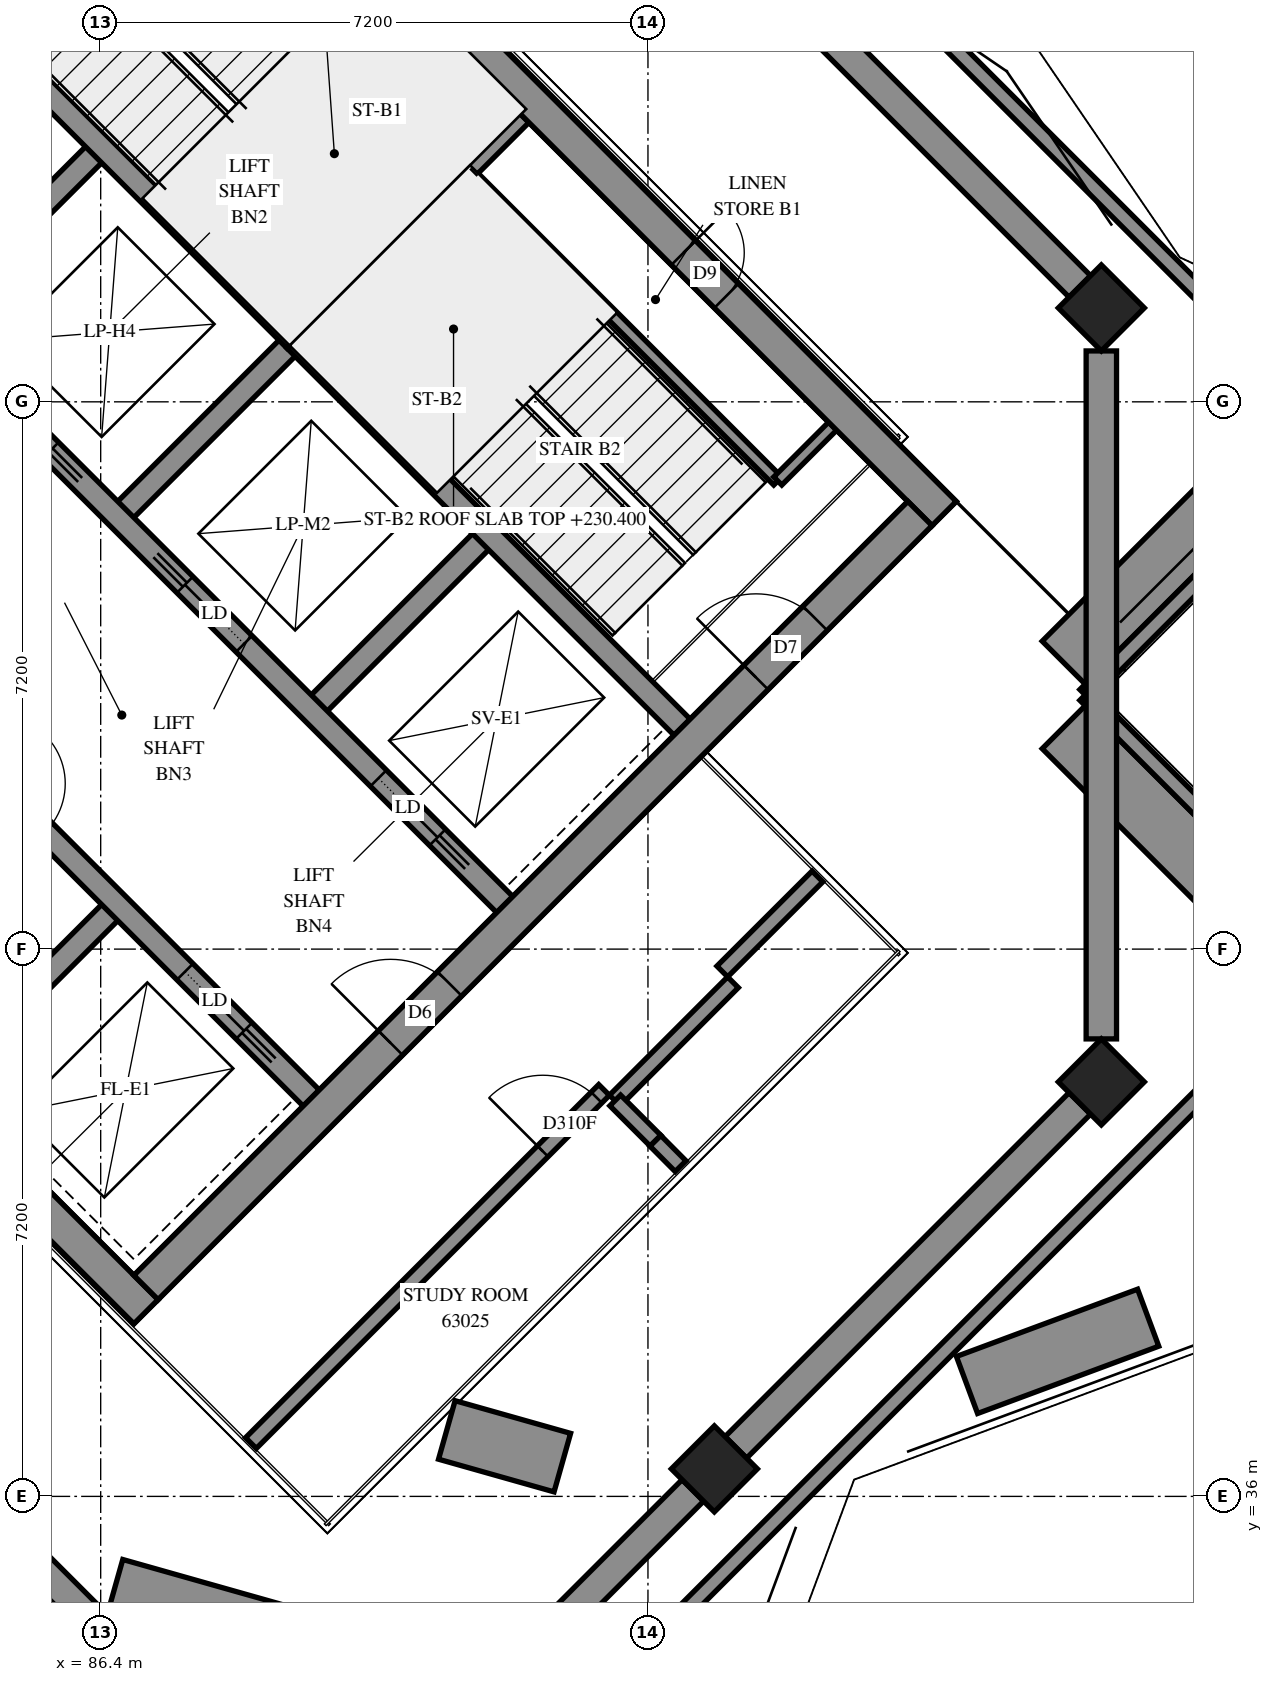
"""IFC4 building model, lengths in metres.
Left out: names, types, materials, properties, quantities, classifications, styles, units other than length and angle.
Written with IfcOpenShell. Run it as: python <this file> out.ifc"""

import sys

from ifc_helpers import new_model, si_unit, direction, frame, frame_2d, origin, origin_2d, place, context, subcontext, project, spatial, polyline, rectangle, outline, extrude, element, fill, save


model = new_model("IFC4")
c1 = context("Model", 3, precision=1e-05, world=origin(), true_north=direction((0.0, 1.0)))
c2 = subcontext(c1, "Body", "Model", "MODEL_VIEW")
j1 = project(units=[si_unit("LENGTHUNIT", "METRE"), si_unit("PLANEANGLEUNIT", "RADIAN")], contexts=[c1])
p1 = place(None, origin())
s1 = spatial("IfcSite", under=j1, at=p1, CompositionType="ELEMENT")
p2 = place(p1, origin())
s2 = spatial("IfcBuilding", under=s1, at=p2, CompositionType="ELEMENT")
p3 = place(p2, frame((0.0, 0.0, 230.4)))
s3 = spatial("IfcBuildingStorey", under=s2, at=p3, CompositionType="ELEMENT", Elevation=230.4)
for number, where, z_axis, x_axis in (
    (1, (99.565, 51.635, 0.0), (0.0, 0.0, 1.0), (0.707, -0.707, 0.0)),
    (2, (99.565, 41.453, 0.0), (0.0, 0.0, 1.0), (0.707, -0.707, 0.0)),
    (3, (94.474, 36.362, 0.0), (0.0, 0.0, 1.0), (0.707, -0.707, 0.0)),
):
    element("IfcColumn", number, at=place(p3, frame(where, z_axis=z_axis, x_axis=x_axis)), inside=s3, PredefinedType="COLUMN", context=c2, shape_type="SweptSolid", body=[
        extrude(rectangle(XDim=0.8, YDim=0.8, at=origin_2d()), origin(), (0.0, 0.0, 1.0), 3.9),
    ])
p4 = place(p3, frame((76.177, 49.249, -0.3), z_axis=(0.0, 0.0, 1.0), x_axis=(0.7071100491, -0.7071035132, 0.0)))
e4 = element("IfcWall", 4, at=p4, inside=s3, PredefinedType="SHEAR", context=c2, shape_type="SweptSolid", body=[
    extrude(rectangle(XDim=15.3, YDim=0.45, at=frame_2d((7.65, 0.0))), origin(), (0.0, 0.0, 1.0), 3.5),
])
p5 = place(p3, frame((86.678, 59.749, -0.3), z_axis=(0.0, 0.0, 1.0), x_axis=(0.7071035132, -0.7071100491, 0.0)))
e5 = element("IfcWall", 5, at=p5, inside=s3, PredefinedType="SHEAR", context=c2, shape_type="SweptSolid", body=[
    extrude(rectangle(XDim=15.3, YDim=0.45, at=frame_2d((7.65, 0.0))), origin(), (0.0, 0.0, 1.0), 3.5),
])
p6 = place(p5, frame((10.45, 0.0, 0.3)))
e6 = element("IfcOpeningElement", 6, at=p6, cuts=e5, PredefinedType="OPENING", context=c2, shape_type="SweptSolid", body=[
    extrude(rectangle(XDim=0.8, YDim=2.1, at=frame_2d((0.4, 1.05))), frame((0.0, 0.235, 0.0), z_axis=(0.0, -1.0, 0.0), x_axis=(1.0, 0.0, 0.0)), (0.0, 0.0, 1.0), 0.47),
])
p7 = place(p3, frame((76.495, 49.249, -0.3), z_axis=(0.0, 0.0, 1.0), x_axis=(0.7071067812, 0.7071067812, 0.0)))
e7 = element("IfcWall", 7, at=p7, inside=s3, PredefinedType="SHEAR", context=c2, shape_type="SweptSolid", body=[
    extrude(rectangle(XDim=14.4, YDim=0.45, at=frame_2d((7.2, 0.0))), origin(), (0.0, 0.0, 1.0), 3.5),
])
p8 = place(p7, frame((4.55, 0.0, 0.3)))
e8 = element("IfcOpeningElement", 8, at=p8, cuts=e7, PredefinedType="OPENING", context=c2, shape_type="SweptSolid", body=[
    extrude(rectangle(XDim=1.1, YDim=2.1, at=frame_2d((0.55, 1.05))), frame((0.0, 0.235, 0.0), z_axis=(0.0, -1.0, 0.0), x_axis=(1.0, 0.0, 0.0)), (0.0, 0.0, 1.0), 0.47),
])
p9 = place(p7, frame((11.35, 0.0, 0.3)))
e9 = element("IfcOpeningElement", 9, at=p9, cuts=e7, PredefinedType="OPENING", context=c2, shape_type="SweptSolid", body=[
    extrude(rectangle(XDim=1.1, YDim=2.1, at=frame_2d((0.55, 1.05))), frame((0.0, 0.235, 0.0), z_axis=(0.0, -1.0, 0.0), x_axis=(1.0, 0.0, 0.0)), (0.0, 0.0, 1.0), 0.47),
])
p10 = place(p3, frame((86.996, 38.748, -0.3), z_axis=(0.0, 0.0, 1.0), x_axis=(0.7071067812, 0.7071067812, 0.0)))
e10 = element("IfcWall", 10, at=p10, inside=s3, PredefinedType="SHEAR", context=c2, shape_type="SweptSolid", body=[
    extrude(rectangle(XDim=14.4, YDim=0.45, at=frame_2d((7.2, 0.0))), origin(), (0.0, 0.0, 1.0), 3.5),
])
p11 = place(p10, frame((4.55, 0.0, 0.3)))
e11 = element("IfcOpeningElement", 11, at=p11, cuts=e10, PredefinedType="OPENING", context=c2, shape_type="SweptSolid", body=[
    extrude(rectangle(XDim=1.1, YDim=2.1, at=frame_2d((0.55, 1.05))), frame((0.0, 0.235, 0.0), z_axis=(0.0, -1.0, 0.0), x_axis=(1.0, 0.0, 0.0)), (0.0, 0.0, 1.0), 0.47),
])
p12 = place(p10, frame((11.35, 0.0, 0.3)))
e12 = element("IfcOpeningElement", 12, at=p12, cuts=e10, PredefinedType="OPENING", context=c2, shape_type="SweptSolid", body=[
    extrude(rectangle(XDim=1.1, YDim=2.1, at=frame_2d((0.55, 1.05))), frame((0.0, 0.235, 0.0), z_axis=(0.0, -1.0, 0.0), x_axis=(1.0, 0.0, 0.0)), (0.0, 0.0, 1.0), 0.47),
])
p13 = place(p3, frame((84.079, 51.423, 0.0), z_axis=(0.0, 0.0, 1.0), x_axis=(0.7071219326, 0.7070916295, 0.0)))
e13 = element("IfcWall", 13, at=p13, inside=s3, PredefinedType="SOLIDWALL", context=c2, shape_type="SweptSolid", body=[
    extrude(rectangle(XDim=3.3, YDim=0.3, at=frame_2d((1.65, 0.0))), origin(), (0.0, 0.0, 1.0), 3.9),
])
p14 = place(p3, frame((86.625, 48.878, 0.0), z_axis=(0.0, 0.0, 1.0), x_axis=(0.7071067812, 0.7071067812, 0.0)))
e14 = element("IfcWall", 14, at=p14, inside=s3, PredefinedType="SOLIDWALL", context=c2, shape_type="SweptSolid", body=[
    extrude(rectangle(XDim=3.3, YDim=0.3, at=frame_2d((1.65, 0.0))), origin(), (0.0, 0.0, 1.0), 3.9),
])
p15 = place(p3, frame((84.291, 41.453, 0.0), z_axis=(0.0, 0.0, 1.0), x_axis=(0.7071067812, 0.7071067812, 0.0)))
e15 = element("IfcWall", 15, at=p15, inside=s3, PredefinedType="SOLIDWALL", context=c2, shape_type="SweptSolid", body=[
    extrude(rectangle(XDim=3.3, YDim=0.3, at=frame_2d((1.65, 0.0))), origin(), (0.0, 0.0, 1.0), 3.9),
])
p16 = place(p3, frame((89.17, 46.332, 0.0), z_axis=(0.0, 0.0, 1.0), x_axis=(0.7071067812, 0.7071067812, 0.0)))
e16 = element("IfcWall", 16, at=p16, inside=s3, PredefinedType="SOLIDWALL", context=c2, shape_type="SweptSolid", body=[
    extrude(rectangle(XDim=3.3, YDim=0.3, at=frame_2d((1.65, 0.0))), origin(), (0.0, 0.0, 1.0), 3.9),
])
p17 = place(p3, frame((78.988, 51.423, 0.0), z_axis=(0.0, 0.0, 1.0), x_axis=(0.7071067812, -0.7071067812, 0.0)))
e17 = element("IfcWall", 17, at=p17, inside=s3, PredefinedType="SOLIDWALL", context=c2, shape_type="SweptSolid", body=[
    extrude(rectangle(XDim=14.4, YDim=0.3, at=frame_2d((7.2, 0.0))), origin(), (0.0, 0.0, 1.0), 3.9),
])
p18 = place(p17, frame((1.35, 0.0, 0.0)))
e18 = element("IfcOpeningElement", 18, at=p18, cuts=e17, PredefinedType="OPENING", context=c2, shape_type="SweptSolid", body=[
    extrude(rectangle(XDim=0.9, YDim=2.1, at=frame_2d((0.45, 1.05))), frame((0.0, 0.16, 0.0), z_axis=(0.0, -1.0, 0.0), x_axis=(1.0, 0.0, 0.0)), (0.0, 0.0, 1.0), 0.32),
])
p19 = place(p17, frame((4.95, 0.0, 0.0)))
e19 = element("IfcOpeningElement", 19, at=p19, cuts=e17, PredefinedType="OPENING", context=c2, shape_type="SweptSolid", body=[
    extrude(rectangle(XDim=0.9, YDim=2.1, at=frame_2d((0.45, 1.05))), frame((0.0, 0.16, 0.0), z_axis=(0.0, -1.0, 0.0), x_axis=(1.0, 0.0, 0.0)), (0.0, 0.0, 1.0), 0.32),
])
p20 = place(p17, frame((8.55, 0.0, 0.0)))
e20 = element("IfcOpeningElement", 20, at=p20, cuts=e17, PredefinedType="OPENING", context=c2, shape_type="SweptSolid", body=[
    extrude(rectangle(XDim=0.9, YDim=2.1, at=frame_2d((0.45, 1.05))), frame((0.0, 0.16, 0.0), z_axis=(0.0, -1.0, 0.0), x_axis=(1.0, 0.0, 0.0)), (0.0, 0.0, 1.0), 0.32),
])
p21 = place(p17, frame((12.05, 0.0, 0.0)))
e21 = element("IfcOpeningElement", 21, at=p21, cuts=e17, PredefinedType="OPENING", context=c2, shape_type="SweptSolid", body=[
    extrude(rectangle(XDim=1.1, YDim=2.1, at=frame_2d((0.55, 1.05))), frame((0.0, 0.16, 0.0), z_axis=(0.0, -1.0, 0.0), x_axis=(1.0, 0.0, 0.0)), (0.0, 0.0, 1.0), 0.32),
])
p22 = place(p3, frame((81.534, 53.969, 0.0), z_axis=(0.0, 0.0, 1.0), x_axis=(0.707103309, -0.7071102534, 0.0)))
e22 = element("IfcWall", 22, at=p22, inside=s3, PredefinedType="SOLIDWALL", context=c2, shape_type="SweptSolid", body=[
    extrude(rectangle(XDim=14.4, YDim=0.3, at=frame_2d((7.2, 0.0))), origin(), (0.0, 0.0, 1.0), 3.9),
])
p23 = place(p22, frame((1.25, 0.0, 0.0)))
e23 = element("IfcOpeningElement", 23, at=p23, cuts=e22, PredefinedType="OPENING", context=c2, shape_type="SweptSolid", body=[
    extrude(rectangle(XDim=1.1, YDim=2.1, at=frame_2d((0.55, 1.05))), frame((0.0, 0.16, 0.0), z_axis=(0.0, -1.0, 0.0), x_axis=(1.0, 0.0, 0.0)), (0.0, 0.0, 1.0), 0.32),
])
p24 = place(p22, frame((4.85, 0.0, 0.0)))
e24 = element("IfcOpeningElement", 24, at=p24, cuts=e22, PredefinedType="OPENING", context=c2, shape_type="SweptSolid", body=[
    extrude(rectangle(XDim=1.1, YDim=2.1, at=frame_2d((0.55, 1.05))), frame((0.0, 0.16, 0.0), z_axis=(0.0, -1.0, 0.0), x_axis=(1.0, 0.0, 0.0)), (0.0, 0.0, 1.0), 0.32),
])
p25 = place(p22, frame((8.45, 0.0, 0.0)))
e25 = element("IfcOpeningElement", 25, at=p25, cuts=e22, PredefinedType="OPENING", context=c2, shape_type="SweptSolid", body=[
    extrude(rectangle(XDim=1.1, YDim=2.1, at=frame_2d((0.55, 1.05))), frame((0.0, 0.16, 0.0), z_axis=(0.0, -1.0, 0.0), x_axis=(1.0, 0.0, 0.0)), (0.0, 0.0, 1.0), 0.32),
])
p26 = place(p22, frame((12.05, 0.0, 0.0)))
e26 = element("IfcOpeningElement", 26, at=p26, cuts=e22, PredefinedType="OPENING", context=c2, shape_type="SweptSolid", body=[
    extrude(rectangle(XDim=1.1, YDim=2.1, at=frame_2d((0.55, 1.05))), frame((0.0, 0.16, 0.0), z_axis=(0.0, -1.0, 0.0), x_axis=(1.0, 0.0, 0.0)), (0.0, 0.0, 1.0), 0.32),
])
for number, where, z_axis, x_axis in (
    (27, (83.867, 56.302, 0.0), (0.0, 0.0, 1.0), (0.707, -0.707, 0.0)),
    (28, (88.958, 51.211, 0.0), (0.0, 0.0, 1.0), (0.707, -0.707, 0.0)),
):
    element("IfcWall", number, at=place(p3, frame(where, z_axis=z_axis, x_axis=x_axis)), inside=s3, PredefinedType="SOLIDWALL", context=c2, shape_type="SweptSolid", body=[
        extrude(rectangle(XDim=7.2, YDim=0.3, at=frame_2d((3.6, 0.0))), origin(), (0.0, 0.0, 1.0), 3.9),
    ])
p27 = place(p3, frame((88.958, 51.211, 0.0), z_axis=(0.0, 0.0, 1.0), x_axis=(0.7071067812, 0.7071067812, 0.0)))
e29 = element("IfcWall", 29, at=p27, inside=s3, PredefinedType="SOLIDWALL", context=c2, shape_type="SweptSolid", body=[
    extrude(rectangle(XDim=4.2, YDim=0.3, at=frame_2d((2.1, 0.0))), origin(), (0.0, 0.0, 1.0), 3.9),
])
p28 = place(p3, frame((97.797, 37.465, 0.0), z_axis=(0.0, 0.0, 1.0), x_axis=(0.937425272, 0.3481865296, 0.0)))
e30 = element("IfcWall", 30, at=p28, inside=s3, PredefinedType="SOLIDWALL", context=c2, shape_type="SweptSolid", body=[
    extrude(rectangle(XDim=2.543, YDim=0.8, at=frame_2d((1.271, 0.0))), origin(), (0.0, 0.0, 1.0), 0.65),
])
p29 = place(p3, frame((101.791, 43.399, 0.0), z_axis=(0.0, 0.0, 1.0), x_axis=(-0.7070807946, 0.7071327668, 0.0)))
e31 = element("IfcWall", 31, at=p29, inside=s3, PredefinedType="SOLIDWALL", context=c2, shape_type="SweptSolid", body=[
    extrude(rectangle(XDim=3.848, YDim=0.8, at=frame_2d((1.924, 0.0))), origin(), (0.0, 0.0, 1.0), 0.65),
])
p30 = place(p3, frame((99.07, 46.968, 0.0), z_axis=(0.0, 0.0, 1.0), x_axis=(0.7071067812, 0.7071067812, 0.0)))
e32 = element("IfcWall", 32, at=p30, inside=s3, PredefinedType="SOLIDWALL", context=c2, shape_type="SweptSolid", body=[
    extrude(rectangle(XDim=4.548, YDim=0.8, at=frame_2d((2.274, 0.0))), origin(), (0.0, 0.0, 1.0), 0.65),
])
p31 = place(p3, frame((92.474, 36.444, 0.0), z_axis=(0.0, 0.0, 1.0), x_axis=(-0.9622658072, 0.2721112204, 0.0)))
e33 = element("IfcWall", 33, at=p31, inside=s3, PredefinedType="SOLIDWALL", context=c2, shape_type="SweptSolid", body=[
    extrude(rectangle(XDim=1.579, YDim=0.8, at=frame_2d((0.79, 0.0))), origin(), (0.0, 0.0, 1.0), 0.65),
])
p32 = place(p3, frame((92.136, 33.214, 0.0), z_axis=(0.0, 0.0, 1.0), x_axis=(-0.9622617834, 0.2721254495, 0.0)))
e34 = element("IfcWall", 34, at=p32, inside=s3, PredefinedType="SOLIDWALL", context=c2, shape_type="SweptSolid", body=[
    extrude(rectangle(XDim=5.772, YDim=0.8, at=frame_2d((2.886, 0.0))), origin(), (0.0, 0.0, 1.0), 0.65),
])
p33 = place(p3, frame((102.747, 43.15, 0.0), z_axis=(0.0, 0.0, 1.0), x_axis=(-0.7071067812, 0.7071067812, 0.0)))
e35 = element("IfcWall", 35, at=p33, inside=s3, PredefinedType="SOLIDWALL", context=c2, shape_type="SweptSolid", body=[
    extrude(outline(polyline([(-0.1, -0.1), (4.7, -0.1), (4.9, 0.1), (0.1, 0.1), (-0.1, -0.1)])), origin(), (0.0, 0.0, 1.0), 4.2),
])
p34 = place(p3, frame((99.353, 46.544, 0.0), z_axis=(0.0, 0.0, 1.0), x_axis=(0.7071171977, 0.7070963646, 0.0)))
e36 = element("IfcWall", 36, at=p34, inside=s3, PredefinedType="SOLIDWALL", context=c2, shape_type="SweptSolid", body=[
    extrude(outline(polyline([(0.1, -0.1), (4.9, -0.1), (4.7, 0.1), (-0.1, 0.1), (0.1, -0.1)])), origin(), (0.0, 0.0, 1.0), 4.2),
])
p35 = place(p3, frame((102.747, 49.938, 0.0), z_axis=(0.0, 0.0, 1.0), x_axis=(-0.7071083109, 0.7071052514, 0.0)))
e37 = element("IfcWall", 37, at=p35, inside=s3, PredefinedType="SOLIDWALL", context=c2, shape_type="SweptSolid", body=[
    extrude(outline(polyline([(-0.1, -0.1), (32.726, -0.1), (32.644, 0.1), (0.1, 0.1), (-0.1, -0.1)])), origin(), (0.0, 0.0, 1.0), 4.2),
])
p36 = place(p3, frame((77.018, 42.15, 0.0), z_axis=(0.0, 0.0, 1.0), x_axis=(0.7071039217, -0.7071096407, 0.0)))
e38 = element("IfcWall", 38, at=p36, inside=s3, PredefinedType="SOLIDWALL", context=c2, shape_type="SweptSolid", body=[
    extrude(outline(polyline([(0.041, -0.1), (17.586, -0.1), (17.386, 0.1), (-0.041, 0.1), (0.041, -0.1)])), origin(), (0.0, 0.0, 1.0), 4.2),
])
p37 = place(p3, frame((89.382, 29.786, 0.0), z_axis=(0.0, 0.0, 1.0), x_axis=(0.7071094267, 0.7071041357, 0.0)))
e39 = element("IfcWall", 39, at=p37, inside=s3, PredefinedType="SOLIDWALL", context=c2, shape_type="SweptSolid", body=[
    extrude(outline(polyline([(-0.1, -0.1), (19.0, -0.1), (18.8, 0.1), (0.1, 0.1), (-0.1, -0.1)])), origin(), (0.0, 0.0, 1.0), 4.2),
])
p38 = place(p3, frame((91.313, 53.354, 0.0), z_axis=(0.0, 0.0, 1.0), x_axis=(0.7071067812, -0.7071067812, 0.0)))
e40 = element("IfcWall", 40, at=p38, inside=s3, PredefinedType="PARTITIONING", context=c2, shape_type="SweptSolid", body=[
    extrude(rectangle(XDim=5.65, YDim=0.15, at=frame_2d((2.825, 0.0))), origin(), (0.0, 0.0, 1.0), 3.9),
])
p39 = place(p3, frame((95.308, 49.358, 0.0), z_axis=(0.0, 0.0, 1.0), x_axis=(0.70705776, 0.707155799, 0.0)))
e41 = element("IfcWall", 41, at=p39, inside=s3, PredefinedType="PARTITIONING", context=c2, shape_type="SweptSolid", body=[
    extrude(rectangle(XDim=1.02, YDim=0.15, at=frame_2d((0.51, 0.0))), origin(), (0.0, 0.0, 1.0), 3.9),
])
p40 = place(p3, frame((88.377, 36.701, 0.0), z_axis=(0.0, 0.0, 1.0), x_axis=(0.7071067812, 0.7071067812, 0.0)))
e42 = element("IfcWall", 42, at=p40, inside=s3, PredefinedType="PARTITIONING", context=c2, shape_type="SweptSolid", body=[
    extrude(rectangle(XDim=6.57, YDim=0.2, at=frame_2d((3.285, 0.0))), origin(), (0.0, 0.0, 1.0), 3.9),
])
p41 = place(p40, frame((5.43, 0.0, 0.0)))
e43 = element("IfcOpeningElement", 43, at=p41, cuts=e42, PredefinedType="OPENING", context=c2, shape_type="SweptSolid", body=[
    extrude(rectangle(XDim=1.0, YDim=2.1, at=frame_2d((0.5, 1.05))), frame((0.0, 0.11, 0.0), z_axis=(0.0, -1.0, 0.0), x_axis=(1.0, 0.0, 0.0)), (0.0, 0.0, 1.0), 0.22),
])
p42 = place(p3, frame((93.164, 41.208, 0.0), z_axis=(0.0, 0.0, 1.0), x_axis=(0.706651904, 0.7075613659, 0.0)))
e44 = element("IfcWall", 44, at=p42, inside=s3, PredefinedType="PARTITIONING", context=c2, shape_type="SweptSolid", body=[
    extrude(rectangle(XDim=2.199, YDim=0.2, at=frame_2d((1.1, 0.0))), origin(), (0.0, 0.0, 1.0), 3.9),
])
p43 = place(p3, frame((94.578, 42.906, 0.0), z_axis=(0.0, 0.0, 1.0), x_axis=(0.7076717883, 0.7065413222, 0.0)))
e45 = element("IfcWall", 45, at=p43, inside=s3, PredefinedType="PARTITIONING", context=c2, shape_type="SweptSolid", body=[
    extrude(rectangle(XDim=1.769, YDim=0.2, at=frame_2d((0.885, 0.0))), origin(), (0.0, 0.0, 1.0), 3.9),
])
p44 = place(p3, frame((93.169, 41.209, 0.0), z_axis=(0.0, 0.0, 1.0), x_axis=(0.7071067812, -0.7071067812, 0.0)))
e46 = element("IfcWall", 46, at=p44, inside=s3, PredefinedType="PARTITIONING", context=c2, shape_type="SweptSolid", body=[
    extrude(rectangle(XDim=0.75, YDim=0.2, at=frame_2d((0.375, 0.0))), origin(), (0.0, 0.0, 1.0), 3.9),
])
p45 = place(p3, frame((93.698, 40.678, 0.0), z_axis=(0.0, 0.0, 1.0), x_axis=(0.7049801586, -0.7092270271, 0.0)))
e47 = element("IfcWall", 47, at=p45, inside=s3, PredefinedType="PARTITIONING", context=c2, shape_type="SweptSolid", body=[
    extrude(rectangle(XDim=0.471, YDim=0.2, at=frame_2d((0.235, 0.0))), origin(), (0.0, 0.0, 1.0), 3.9),
])
p46 = place(p6, origin())
e48 = element("IfcDoor", 48, at=p46, inside=s3, OperationType="SINGLE_SWING_RIGHT", PredefinedType="DOOR", context=c2, shape_type="SweptSolid", body=[
    extrude(rectangle(XDim=0.8, YDim=2.1, at=frame_2d((0.4, 1.05))), frame((0.0, 0.025, 0.0), z_axis=(0.0, -1.0, 0.0), x_axis=(1.0, 0.0, 0.0)), (0.0, 0.0, 1.0), 0.05),
])
fill(e6, e48)
p47 = place(p11, origin())
e49 = element("IfcDoor", 49, at=p47, inside=s3, OperationType="DOUBLE_DOOR_SINGLE_SWING", PredefinedType="DOOR", context=c2, shape_type="SweptSolid", body=[
    extrude(rectangle(XDim=1.1, YDim=2.1, at=frame_2d((0.55, 1.05))), frame((0.0, 0.025, 0.0), z_axis=(0.0, -1.0, 0.0), x_axis=(1.0, 0.0, 0.0)), (0.0, 0.0, 1.0), 0.05),
])
fill(e11, e49)
p48 = place(p12, origin())
e50 = element("IfcDoor", 50, at=p48, inside=s3, OperationType="SINGLE_SWING_RIGHT", PredefinedType="DOOR", context=c2, shape_type="SweptSolid", body=[
    extrude(rectangle(XDim=1.1, YDim=2.1, at=frame_2d((0.55, 1.05))), frame((0.0, 0.025, 0.0), z_axis=(0.0, -1.0, 0.0), x_axis=(1.0, 0.0, 0.0)), (0.0, 0.0, 1.0), 0.05),
])
fill(e12, e50)
p49 = place(p21, origin())
e51 = element("IfcDoor", 51, at=p49, inside=s3, OperationType="SLIDING_TO_RIGHT", PredefinedType="DOOR", context=c2, shape_type="SweptSolid", body=[
    extrude(rectangle(XDim=1.1, YDim=2.1, at=frame_2d((0.55, 1.05))), frame((0.0, 0.025, 0.0), z_axis=(0.0, -1.0, 0.0), x_axis=(1.0, 0.0, 0.0)), (0.0, 0.0, 1.0), 0.05),
])
fill(e21, e51)
p50 = place(p25, origin())
e52 = element("IfcDoor", 52, at=p50, inside=s3, OperationType="SLIDING_TO_LEFT", PredefinedType="DOOR", context=c2, shape_type="SweptSolid", body=[
    extrude(rectangle(XDim=1.1, YDim=2.1, at=frame_2d((0.55, 1.05))), frame((0.0, 0.025, 0.0), z_axis=(0.0, -1.0, 0.0), x_axis=(1.0, 0.0, 0.0)), (0.0, 0.0, 1.0), 0.05),
])
fill(e25, e52)
p51 = place(p26, origin())
e53 = element("IfcDoor", 53, at=p51, inside=s3, OperationType="SLIDING_TO_RIGHT", PredefinedType="DOOR", context=c2, shape_type="SweptSolid", body=[
    extrude(rectangle(XDim=1.1, YDim=2.1, at=frame_2d((0.55, 1.05))), frame((0.0, 0.025, 0.0), z_axis=(0.0, -1.0, 0.0), x_axis=(1.0, 0.0, 0.0)), (0.0, 0.0, 1.0), 0.05),
])
fill(e26, e53)
p52 = place(p41, origin())
e54 = element("IfcDoor", 54, at=p52, inside=s3, OperationType="SINGLE_SWING_LEFT", PredefinedType="DOOR", context=c2, shape_type="SweptSolid", body=[
    extrude(rectangle(XDim=1.0, YDim=2.1, at=frame_2d((0.5, 1.05))), frame((0.0, 0.025, 0.0), z_axis=(0.0, -1.0, 0.0), x_axis=(1.0, 0.0, 0.0)), (0.0, 0.0, 1.0), 0.05),
])
fill(e43, e54)
save(model, sys.argv[1])
